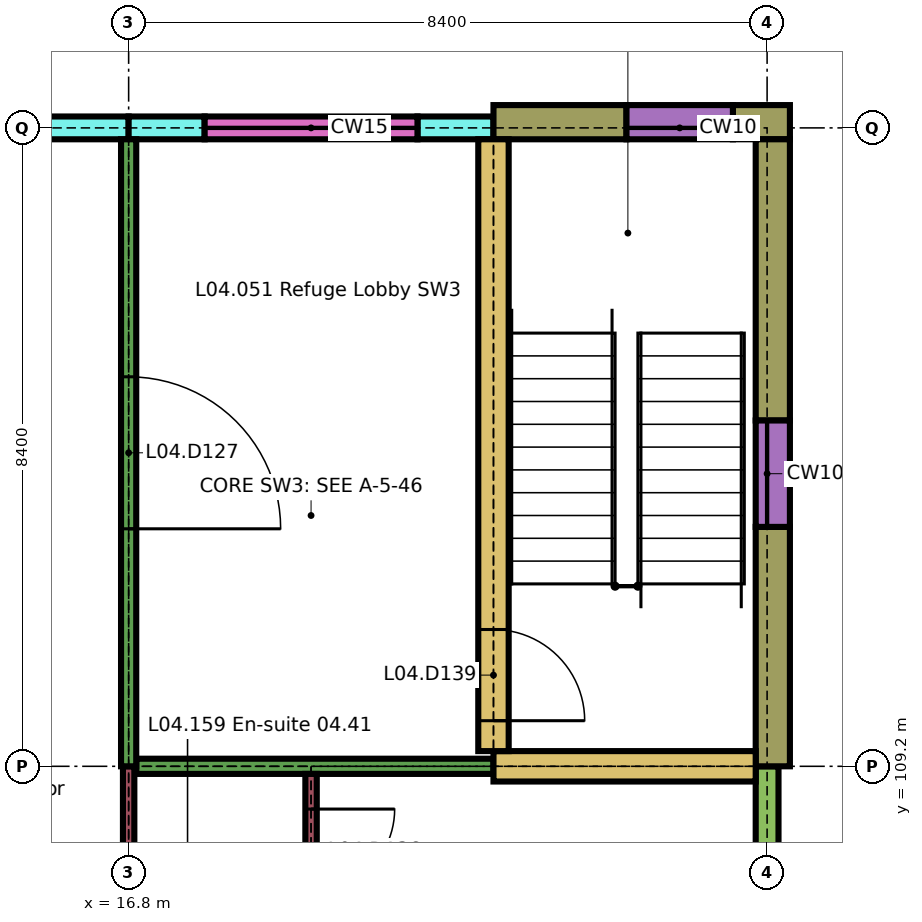
"""IFC4 building model, lengths in metres.
Left out: names, types, materials, properties, quantities, classifications, styles, units other than length and angle.
Written with IfcOpenShell. Run it as: python <this file> out.ifc"""

import sys

from ifc_helpers import new_model, si_unit, direction, frame, frame_2d, origin, place, context, subcontext, project, spatial, rectangle, extrude, element, fill, save


model = new_model("IFC4")
c1 = context("Model", 3, precision=1e-05, world=origin(), true_north=direction((0.0, 1.0)))
c2 = subcontext(c1, "Body", "Model", "MODEL_VIEW")
j1 = project(units=[si_unit("LENGTHUNIT", "METRE"), si_unit("PLANEANGLEUNIT", "RADIAN")], contexts=[c1])
p1 = place(None, origin())
s1 = spatial("IfcSite", under=j1, at=p1, CompositionType="ELEMENT")
p2 = place(p1, origin())
s2 = spatial("IfcBuilding", under=s1, at=p2, CompositionType="ELEMENT")
p3 = place(p2, frame((0.0, 0.0, 18.9)))
s3 = spatial("IfcBuildingStorey", under=s2, at=p3, CompositionType="ELEMENT", Elevation=18.9)
p4 = place(p3, frame((13.8, 117.6, 0.0), z_axis=(0.0, 0.0, 1.0), x_axis=(1.0, 0.0, 0.0)))
e1 = element("IfcWall", 1, at=p4, inside=s3, PredefinedType="SOLIDWALL", context=c2, shape_type="SweptSolid", body=[
    extrude(rectangle(XDim=3.0, YDim=0.3, at=frame_2d((1.5, 0.0))), origin(), (0.0, 0.0, 1.0), 3.26),
])
p5 = place(p4, frame((0.45, 0.0, 0.9)))
e2 = element("IfcOpeningElement", 2, at=p5, cuts=e1, PredefinedType="OPENING", context=c2, shape_type="SweptSolid", body=[
    extrude(rectangle(XDim=0.9, YDim=1.5, at=frame_2d((0.45, 0.75))), frame((0.0, 0.16, 0.0), z_axis=(0.0, -1.0, 0.0), x_axis=(1.0, 0.0, 0.0)), (0.0, 0.0, 1.0), 0.32),
])
for number, where, z_axis, x_axis in (
    (3, (16.8, 117.6, 0.0), (0.0, 0.0, 1.0), (1.0, 0.0, 0.0)),
    (4, (20.6, 117.6, 0.0), (0.0, 0.0, 1.0), (1.0, 0.0, 0.0)),
):
    element("IfcWall", number, at=place(p3, frame(where, z_axis=z_axis, x_axis=x_axis)), inside=s3, PredefinedType="SOLIDWALL", context=c2, shape_type="SweptSolid", body=[
        extrude(rectangle(XDim=1.0, YDim=0.3, at=frame_2d((0.5, 0.0))), origin(), (0.0, 0.0, 1.0), 3.26),
    ])
p6 = place(p3, frame((17.8, 117.6, 0.0), z_axis=(0.0, 0.0, 1.0), x_axis=(1.0, 0.0, 0.0)))
e5 = element("IfcWall", 5, at=p6, inside=s3, PredefinedType="SOLIDWALL", context=c2, shape_type="SweptSolid", body=[
    extrude(rectangle(XDim=2.8, YDim=0.3, at=frame_2d((1.4, 0.0))), origin(), (0.0, 0.0, 1.0), 0.6),
])
p7 = place(p3, frame((21.6, 117.675, 0.0), z_axis=(0.0, 0.0, 1.0), x_axis=(1.0, 0.0, 0.0)))
e6 = element("IfcWall", 6, at=p7, inside=s3, PredefinedType="SOLIDWALL", context=c2, shape_type="SweptSolid", body=[
    extrude(rectangle(XDim=1.75, YDim=0.45, at=frame_2d((0.875, 0.0))), origin(), (0.0, 0.0, 1.0), 3.26),
])
p8 = place(p3, frame((24.75, 117.675, 0.0), z_axis=(0.0, 0.0, 1.0), x_axis=(1.0, 0.0, 0.0)))
e7 = element("IfcWall", 7, at=p8, inside=s3, PredefinedType="SOLIDWALL", context=c2, shape_type="SweptSolid", body=[
    extrude(rectangle(XDim=0.75, YDim=0.45, at=frame_2d((0.375, 0.0))), origin(), (0.0, 0.0, 1.0), 3.26),
])
p9 = place(p3, frame((23.35, 117.675, 0.0), z_axis=(0.0, 0.0, 1.0), x_axis=(1.0, 0.0, 0.0)))
e8 = element("IfcWall", 8, at=p9, inside=s3, PredefinedType="SOLIDWALL", context=c2, shape_type="SweptSolid", body=[
    extrude(rectangle(XDim=1.4, YDim=0.45, at=frame_2d((0.7, 0.0))), origin(), (0.0, 0.0, 1.0), 0.6),
])
p10 = place(p3, frame((25.2, 105.0, 0.0), z_axis=(0.0, 0.0, 1.0), x_axis=(0.0, 1.0, 0.0)))
e9 = element("IfcWall", 9, at=p10, inside=s3, PredefinedType="SOLIDWALL", context=c2, shape_type="SweptSolid", body=[
    extrude(rectangle(XDim=4.2, YDim=0.3, at=frame_2d((2.1, 0.0))), origin(), (0.0, 0.0, 1.0), 2.96),
])
p11 = place(p10, frame((1.05, 0.0, 0.9)))
e10 = element("IfcOpeningElement", 10, at=p11, cuts=e9, PredefinedType="OPENING", context=c2, shape_type="SweptSolid", body=[
    extrude(rectangle(XDim=2.1, YDim=1.5, at=frame_2d((1.05, 0.75))), frame((0.0, 0.16, 0.0), z_axis=(0.0, -1.0, 0.0), x_axis=(1.0, 0.0, 0.0)), (0.0, 0.0, 1.0), 0.32),
])
p12 = place(p3, frame((25.275, 109.2, 0.0), z_axis=(0.0, 0.0, 1.0), x_axis=(0.0, 1.0, 0.0)))
e11 = element("IfcWall", 11, at=p12, inside=s3, PredefinedType="SOLIDWALL", context=c2, shape_type="SweptSolid", body=[
    extrude(rectangle(XDim=3.15, YDim=0.45, at=frame_2d((1.575, 0.0))), origin(), (0.0, 0.0, 1.0), 3.26),
])
p13 = place(p3, frame((25.275, 113.75, 0.0), z_axis=(0.0, 0.0, 1.0), x_axis=(0.0, 1.0, 0.0)))
e12 = element("IfcWall", 12, at=p13, inside=s3, PredefinedType="SOLIDWALL", context=c2, shape_type="SweptSolid", body=[
    extrude(rectangle(XDim=3.7, YDim=0.45, at=frame_2d((1.85, 0.0))), origin(), (0.0, 0.0, 1.0), 3.26),
])
p14 = place(p3, frame((25.275, 112.35, 0.0), z_axis=(0.0, 0.0, 1.0), x_axis=(0.0, 1.0, 0.0)))
e13 = element("IfcWall", 13, at=p14, inside=s3, PredefinedType="SOLIDWALL", context=c2, shape_type="SweptSolid", body=[
    extrude(rectangle(XDim=1.4, YDim=0.45, at=frame_2d((0.7, 0.0))), origin(), (0.0, 0.0, 1.0), 0.6),
])
p15 = place(p3, frame((16.9, 109.2, 0.0), z_axis=(0.0, 0.0, 1.0), x_axis=(1.0, 0.0, 0.0)))
e14 = element("IfcWall", 14, at=p15, inside=s3, PredefinedType="PARTITIONING", context=c2, shape_type="SweptSolid", body=[
    extrude(rectangle(XDim=4.7, YDim=0.2, at=frame_2d((2.35, 0.0))), origin(), (0.0, 0.0, 1.0), 3.26),
])
p16 = place(p3, frame((21.6, 109.2, 0.0), z_axis=(0.0, 0.0, 1.0), x_axis=(1.0, 0.0, 0.0)))
e15 = element("IfcWall", 15, at=p16, inside=s3, PredefinedType="SHEAR", context=c2, shape_type="SweptSolid", body=[
    extrude(rectangle(XDim=3.45, YDim=0.4, at=frame_2d((1.725, 0.0))), origin(), (0.0, 0.0, 1.0), 3.26),
])
p17 = place(p3, frame((16.8, 101.15, 0.0), z_axis=(0.0, 0.0, 1.0), x_axis=(0.0, 1.0, 0.0)))
e16 = element("IfcWall", 16, at=p17, inside=s3, PredefinedType="PARTITIONING", context=c2, shape_type="SweptSolid", body=[
    extrude(rectangle(XDim=8.05, YDim=0.15, at=frame_2d((4.025, 0.0))), origin(), (0.0, 0.0, 1.0), 3.26),
])
p18 = place(p17, frame((2.1, 0.0, 0.0)))
e17 = element("IfcOpeningElement", 17, at=p18, cuts=e16, PredefinedType="OPENING", context=c2, shape_type="SweptSolid", body=[
    extrude(rectangle(XDim=1.5, YDim=2.4, at=frame_2d((0.75, 1.2))), frame((0.0, 0.085, 0.0), z_axis=(0.0, -1.0, 0.0), x_axis=(1.0, 0.0, 0.0)), (0.0, 0.0, 1.0), 0.17),
])
p19 = place(p17, frame((4.1, 0.0, 0.0)))
e18 = element("IfcOpeningElement", 18, at=p19, cuts=e16, PredefinedType="OPENING", context=c2, shape_type="SweptSolid", body=[
    extrude(rectangle(XDim=1.5, YDim=2.4, at=frame_2d((0.75, 1.2))), frame((0.0, 0.085, 0.0), z_axis=(0.0, -1.0, 0.0), x_axis=(1.0, 0.0, 0.0)), (0.0, 0.0, 1.0), 0.17),
])
p20 = place(p3, frame((16.8, 109.2, 0.0), z_axis=(0.0, 0.0, 1.0), x_axis=(0.0, 1.0, 0.0)))
e19 = element("IfcWall", 19, at=p20, inside=s3, PredefinedType="PARTITIONING", context=c2, shape_type="SweptSolid", body=[
    extrude(rectangle(XDim=8.25, YDim=0.2, at=frame_2d((4.125, 0.0))), origin(), (0.0, 0.0, 1.0), 3.26),
])
p21 = place(p20, frame((3.125, 0.0, 0.0)))
e20 = element("IfcOpeningElement", 20, at=p21, cuts=e19, PredefinedType="OPENING", context=c2, shape_type="SweptSolid", body=[
    extrude(rectangle(XDim=2.0, YDim=2.4, at=frame_2d((1.0, 1.2))), frame((0.0, 0.11, 0.0), z_axis=(0.0, -1.0, 0.0), x_axis=(1.0, 0.0, 0.0)), (0.0, 0.0, 1.0), 0.22),
])
p22 = place(p3, frame((19.2, 107.075, 0.0), z_axis=(0.0, 0.0, 1.0), x_axis=(0.0, 1.0, 0.0)))
e21 = element("IfcWall", 21, at=p22, inside=s3, PredefinedType="PARTITIONING", context=c2, shape_type="SweptSolid", body=[
    extrude(rectangle(XDim=2.025, YDim=0.15, at=frame_2d((1.013, 0.0))), origin(), (0.0, 0.0, 1.0), 3.26),
])
p23 = place(p22, frame((0.462, 0.0, 0.0)))
e22 = element("IfcOpeningElement", 22, at=p23, cuts=e21, PredefinedType="OPENING", context=c2, shape_type="SweptSolid", body=[
    extrude(rectangle(XDim=1.1, YDim=2.1, at=frame_2d((0.55, 1.05))), frame((0.0, 0.085, 0.0), z_axis=(0.0, -1.0, 0.0), x_axis=(1.0, 0.0, 0.0)), (0.0, 0.0, 1.0), 0.17),
])
p24 = place(p3, frame((21.6, 109.4, 0.0), z_axis=(0.0, 0.0, 1.0), x_axis=(0.0, 1.0, 0.0)))
e23 = element("IfcWall", 23, at=p24, inside=s3, PredefinedType="SHEAR", context=c2, shape_type="SweptSolid", body=[
    extrude(rectangle(XDim=8.05, YDim=0.4, at=frame_2d((4.025, 0.0))), origin(), (0.0, 0.0, 1.0), 3.26),
])
p25 = place(p24, frame((0.4, 0.0, 0.0)))
e24 = element("IfcOpeningElement", 24, at=p25, cuts=e23, PredefinedType="OPENING", context=c2, shape_type="SweptSolid", body=[
    extrude(rectangle(XDim=1.2, YDim=2.1, at=frame_2d((0.6, 1.05))), frame((0.0, 0.21, 0.0), z_axis=(0.0, -1.0, 0.0), x_axis=(1.0, 0.0, 0.0)), (0.0, 0.0, 1.0), 0.42),
])
p26 = place(p21, origin())
e25 = element("IfcDoor", 25, at=p26, inside=s3, OperationType="SINGLE_SWING_LEFT", PredefinedType="DOOR", context=c2, shape_type="SweptSolid", body=[
    extrude(rectangle(XDim=2.0, YDim=2.4, at=frame_2d((1.0, 1.2))), frame((0.0, 0.03, 0.0), z_axis=(0.0, -1.0, 0.0), x_axis=(1.0, 0.0, 0.0)), (0.0, 0.0, 1.0), 0.06),
])
fill(e20, e25)
p27 = place(p23, origin())
e26 = element("IfcDoor", 26, at=p27, inside=s3, OperationType="SINGLE_SWING_RIGHT", PredefinedType="DOOR", context=c2, shape_type="SweptSolid", body=[
    extrude(rectangle(XDim=1.1, YDim=2.1, at=frame_2d((0.55, 1.05))), frame((0.0, 0.025, 0.0), z_axis=(0.0, -1.0, 0.0), x_axis=(1.0, 0.0, 0.0)), (0.0, 0.0, 1.0), 0.05),
])
fill(e22, e26)
p28 = place(p25, origin())
e27 = element("IfcDoor", 27, at=p28, inside=s3, OperationType="SINGLE_SWING_LEFT", PredefinedType="DOOR", context=c2, shape_type="SweptSolid", body=[
    extrude(rectangle(XDim=1.2, YDim=2.1, at=frame_2d((0.6, 1.05))), frame((0.0, 0.025, 0.0), z_axis=(0.0, -1.0, 0.0), x_axis=(1.0, 0.0, 0.0)), (0.0, 0.0, 1.0), 0.05),
])
fill(e24, e27)
save(model, sys.argv[1])
